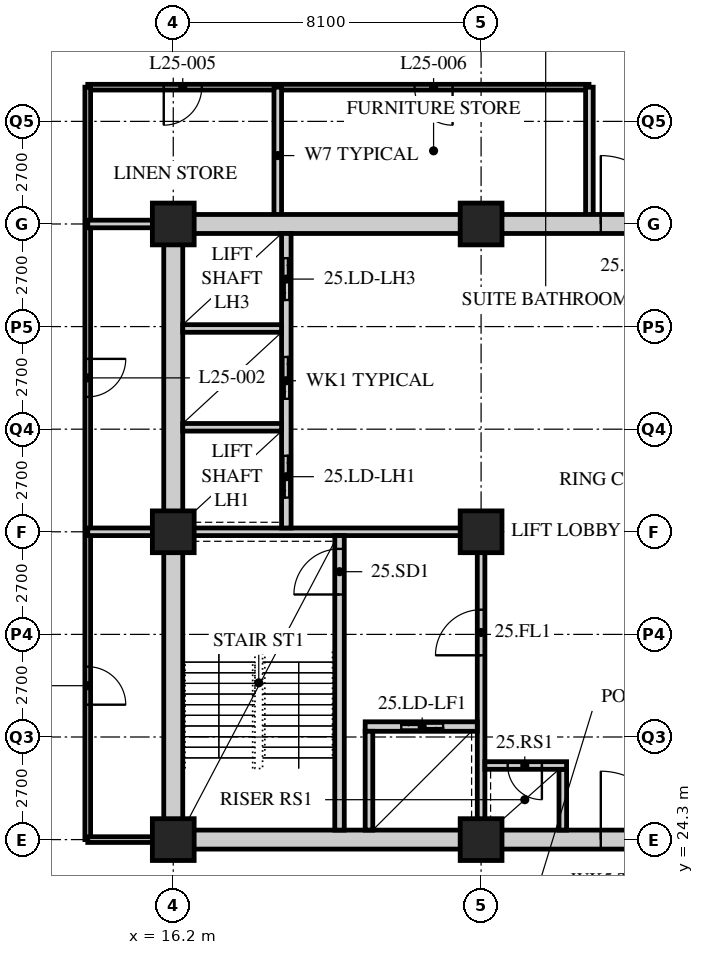
"""IFC4 building model, lengths in metres.
Left out: names, types, materials, properties, quantities, classifications, styles, units other than length and angle.
Written with IfcOpenShell. Run it as: python <this file> out.ifc"""

import sys

from ifc_helpers import new_model, si_unit, direction, frame, frame_2d, origin, origin_2d, place, context, subcontext, project, spatial, rectangle, hollow_rectangle, extrude, element, fill, save


model = new_model("IFC4")
c1 = context("Model", 3, precision=1e-05, world=origin(), true_north=direction((0.0, 1.0)))
c2 = subcontext(c1, "Body", "Model", "MODEL_VIEW")
j1 = project(units=[si_unit("LENGTHUNIT", "METRE"), si_unit("PLANEANGLEUNIT", "RADIAN")], contexts=[c1])
p1 = place(None, origin())
s1 = spatial("IfcSite", under=j1, at=p1, CompositionType="ELEMENT")
p2 = place(p1, origin())
s2 = spatial("IfcBuilding", under=s1, at=p2, CompositionType="ELEMENT")
p3 = place(p2, frame((0.0, 0.0, 103.4)))
s3 = spatial("IfcBuildingStorey", under=s2, at=p3, CompositionType="ELEMENT", Elevation=103.4)
for number, where, z_axis, x_axis in (
    (1, (16.2, 24.3, 0.0), (0.0, 0.0, 1.0), (1.0, 0.0, 0.0)),
    (2, (16.2, 32.4, 0.0), (0.0, 0.0, 1.0), (1.0, 0.0, 0.0)),
    (3, (16.2, 40.5, 0.0), (0.0, 0.0, 1.0), (1.0, 0.0, 0.0)),
    (4, (24.3, 24.3, 0.0), (0.0, 0.0, 1.0), (1.0, 0.0, 0.0)),
    (5, (24.3, 32.4, 0.0), (0.0, 0.0, 1.0), (1.0, 0.0, 0.0)),
    (6, (24.3, 40.5, 0.0), (0.0, 0.0, 1.0), (1.0, 0.0, 0.0)),
):
    element("IfcColumn", number, at=place(p3, frame(where, z_axis=z_axis, x_axis=x_axis)), inside=s3, PredefinedType="COLUMN", context=c2, shape_type="SweptSolid", body=[
        extrude(hollow_rectangle(XDim=1.1, YDim=1.1, WallThickness=0.1, at=origin_2d()), origin(), (0.0, 0.0, 1.0), 3.4),
    ])
p4 = place(p3, frame((27.14, 44.1, 0.0), z_axis=(0.0, 0.0, 1.0), x_axis=(-1.0, 0.0, 0.0)))
e7 = element("IfcWall", 7, at=p4, inside=s3, PredefinedType="PARTITIONING", context=c2, shape_type="SweptSolid", body=[
    extrude(rectangle(XDim=13.19, YDim=0.15, at=frame_2d((6.595, 0.0))), origin(), (0.0, 0.0, 1.0), 3.19),
])
p5 = place(p4, frame((10.19, 0.0, 0.0)))
e8 = element("IfcOpeningElement", 8, at=p5, cuts=e7, PredefinedType="OPENING", context=c2, shape_type="SweptSolid", body=[
    extrude(rectangle(XDim=1.0, YDim=2.1, at=frame_2d((0.5, 1.05))), frame((0.0, 0.085, 0.0), z_axis=(0.0, -1.0, 0.0), x_axis=(1.0, 0.0, 0.0)), (0.0, 0.0, 1.0), 0.17),
])
p6 = place(p4, frame((3.59, 0.0, 0.0)))
e9 = element("IfcOpeningElement", 9, at=p6, cuts=e7, PredefinedType="OPENING", context=c2, shape_type="SweptSolid", body=[
    extrude(rectangle(XDim=1.0, YDim=2.1, at=frame_2d((0.5, 1.05))), frame((0.0, 0.085, 0.0), z_axis=(0.0, -1.0, 0.0), x_axis=(1.0, 0.0, 0.0)), (0.0, 0.0, 1.0), 0.17),
])
p7 = place(p3, frame((13.95, 44.1, 0.0), z_axis=(0.0, 0.0, 1.0), x_axis=(0.0, -1.0, 0.0)))
e10 = element("IfcWall", 10, at=p7, inside=s3, PredefinedType="PARTITIONING", context=c2, shape_type="SweptSolid", body=[
    extrude(rectangle(XDim=19.8, YDim=0.15, at=frame_2d((9.9, 0.0))), origin(), (0.0, 0.0, 1.0), 3.19),
])
p8 = place(p7, frame((15.25, 0.0, 0.0)))
e11 = element("IfcOpeningElement", 11, at=p8, cuts=e10, PredefinedType="OPENING", context=c2, shape_type="SweptSolid", body=[
    extrude(rectangle(XDim=1.0, YDim=2.1, at=frame_2d((0.5, 1.05))), frame((0.0, 0.085, 0.0), z_axis=(0.0, -1.0, 0.0), x_axis=(1.0, 0.0, 0.0)), (0.0, 0.0, 1.0), 0.17),
])
p9 = place(p7, frame((7.15, 0.0, 0.0)))
e12 = element("IfcOpeningElement", 12, at=p9, cuts=e10, PredefinedType="OPENING", context=c2, shape_type="SweptSolid", body=[
    extrude(rectangle(XDim=1.0, YDim=2.1, at=frame_2d((0.5, 1.05))), frame((0.0, 0.085, 0.0), z_axis=(0.0, -1.0, 0.0), x_axis=(1.0, 0.0, 0.0)), (0.0, 0.0, 1.0), 0.17),
])
p10 = place(p3, frame((13.95, 24.3, 0.0), z_axis=(0.0, 0.0, 1.0), x_axis=(1.0, 0.0, 0.0)))
e13 = element("IfcWall", 13, at=p10, inside=s3, PredefinedType="PARTITIONING", context=c2, shape_type="SweptSolid", body=[
    extrude(rectangle(XDim=2.05, YDim=0.15, at=frame_2d((1.025, 0.0))), origin(), (0.0, 0.0, 1.0), 3.19),
])
p11 = place(p3, frame((13.95, 32.4, 0.0), z_axis=(0.0, 0.0, 1.0), x_axis=(1.0, 0.0, 0.0)))
e14 = element("IfcWall", 14, at=p11, inside=s3, PredefinedType="SOLIDWALL", context=c2, shape_type="SweptSolid", body=[
    extrude(rectangle(XDim=2.25, YDim=0.2, at=frame_2d((1.125, 0.0))), origin(), (0.0, 0.0, 1.0), 3.19),
])
for number, where, z_axis, x_axis in (
    (15, (18.95, 44.1, 0.0), (0.0, 0.0, 1.0), (0.0, -1.0, 0.0)),
    (16, (27.15, 40.5, 0.0), (0.0, 0.0, 1.0), (0.0, 1.0, 0.0)),
):
    element("IfcWall", number, at=place(p3, frame(where, z_axis=z_axis, x_axis=x_axis)), inside=s3, PredefinedType="SOLIDWALL", context=c2, shape_type="SweptSolid", body=[
        extrude(rectangle(XDim=3.6, YDim=0.2, at=frame_2d((1.8, 0.0))), origin(), (0.0, 0.0, 1.0), 3.19),
    ])
p12 = place(p3, frame((13.95, 40.5, 0.0), z_axis=(0.0, 0.0, 1.0), x_axis=(1.0, 0.0, 0.0)))
e17 = element("IfcWall", 17, at=p12, inside=s3, PredefinedType="SOLIDWALL", context=c2, shape_type="SweptSolid", body=[
    extrude(rectangle(XDim=2.25, YDim=0.2, at=frame_2d((1.125, 0.0))), origin(), (0.0, 0.0, 1.0), 3.19),
])
p13 = place(p3, frame((15.95, 24.3, 0.0), z_axis=(0.0, 0.0, 1.0), x_axis=(1.0, 0.0, 0.0)))
e18 = element("IfcWall", 18, at=p13, inside=s3, PredefinedType="SOLIDWALL", context=c2, shape_type="SweptSolid", body=[
    extrude(rectangle(XDim=24.8, YDim=0.5, at=frame_2d((12.4, 0.0))), origin(), (0.0, 0.0, 1.0), 2.54),
])
p14 = place(p13, frame((11.5, 0.0, 0.0)))
e19 = element("IfcOpeningElement", 19, at=p14, cuts=e18, PredefinedType="OPENING", context=c2, shape_type="SweptSolid", body=[
    extrude(rectangle(XDim=1.8, YDim=2.4, at=frame_2d((0.9, 1.2))), frame((0.0, 0.26, 0.0), z_axis=(0.0, -1.0, 0.0), x_axis=(1.0, 0.0, 0.0)), (0.0, 0.0, 1.0), 0.52),
])
p15 = place(p3, frame((15.95, 40.5, 0.0), z_axis=(0.0, 0.0, 1.0), x_axis=(1.0, 0.0, 0.0)))
e20 = element("IfcWall", 20, at=p15, inside=s3, PredefinedType="SOLIDWALL", context=c2, shape_type="SweptSolid", body=[
    extrude(rectangle(XDim=24.8, YDim=0.5, at=frame_2d((12.4, 0.0))), origin(), (0.0, 0.0, 1.0), 2.54),
])
p16 = place(p15, frame((11.5, 0.0, 0.0)))
e21 = element("IfcOpeningElement", 21, at=p16, cuts=e20, PredefinedType="OPENING", context=c2, shape_type="SweptSolid", body=[
    extrude(rectangle(XDim=1.8, YDim=2.4, at=frame_2d((0.9, 1.2))), frame((0.0, 0.26, 0.0), z_axis=(0.0, -1.0, 0.0), x_axis=(1.0, 0.0, 0.0)), (0.0, 0.0, 1.0), 0.52),
])
p17 = place(p3, frame((16.2, 24.55, 0.0), z_axis=(0.0, 0.0, 1.0), x_axis=(0.0, 1.0, 0.0)))
e22 = element("IfcWall", 22, at=p17, inside=s3, PredefinedType="SOLIDWALL", context=c2, shape_type="SweptSolid", body=[
    extrude(rectangle(XDim=15.7, YDim=0.5, at=frame_2d((7.85, 0.0))), origin(), (0.0, 0.0, 1.0), 2.578),
])
p18 = place(p3, frame((16.45, 32.4, 0.0), z_axis=(0.0, 0.0, 1.0), x_axis=(1.0, 0.0, 0.0)))
e23 = element("IfcWall", 23, at=p18, inside=s3, PredefinedType="SOLIDWALL", context=c2, shape_type="SweptSolid", body=[
    extrude(rectangle(XDim=7.95, YDim=0.2, at=frame_2d((3.975, 0.0))), origin(), (0.0, 0.0, 1.0), 2.578),
])
p19 = place(p3, frame((24.3, 24.55, 0.0), z_axis=(0.0, 0.0, 1.0), x_axis=(0.0, 1.0, 0.0)))
e24 = element("IfcWall", 24, at=p19, inside=s3, PredefinedType="SOLIDWALL", context=c2, shape_type="SweptSolid", body=[
    extrude(rectangle(XDim=7.75, YDim=0.2, at=frame_2d((3.875, 0.0))), origin(), (0.0, 0.0, 1.0), 2.578),
])
p20 = place(p19, frame((4.6, 0.0, 0.0)))
e25 = element("IfcOpeningElement", 25, at=p20, cuts=e24, PredefinedType="OPENING", context=c2, shape_type="SweptSolid", body=[
    extrude(rectangle(XDim=1.2, YDim=2.1, at=frame_2d((0.6, 1.05))), frame((0.0, 0.11, 0.0), z_axis=(0.0, -1.0, 0.0), x_axis=(1.0, 0.0, 0.0)), (0.0, 0.0, 1.0), 0.22),
])
p21 = place(p3, frame((20.575, 24.55, 0.0), z_axis=(0.0, 0.0, 1.0), x_axis=(0.0, 1.0, 0.0)))
e26 = element("IfcWall", 26, at=p21, inside=s3, PredefinedType="SOLIDWALL", context=c2, shape_type="SweptSolid", body=[
    extrude(rectangle(XDim=7.75, YDim=0.25, at=frame_2d((3.875, 0.0))), origin(), (0.0, 0.0, 1.0), 3.19),
])
p22 = place(p21, frame((6.2, 0.0, 0.0)))
e27 = element("IfcOpeningElement", 27, at=p22, cuts=e26, PredefinedType="OPENING", context=c2, shape_type="SweptSolid", body=[
    extrude(rectangle(XDim=1.2, YDim=2.1, at=frame_2d((0.6, 1.05))), frame((0.0, 0.135, 0.0), z_axis=(0.0, -1.0, 0.0), x_axis=(1.0, 0.0, 0.0)), (0.0, 0.0, 1.0), 0.27),
])
p23 = place(p3, frame((21.25, 27.275, 0.0), z_axis=(0.0, 0.0, 1.0), x_axis=(1.0, 0.0, 0.0)))
e28 = element("IfcWall", 28, at=p23, inside=s3, PredefinedType="SOLIDWALL", context=c2, shape_type="SweptSolid", body=[
    extrude(rectangle(XDim=2.95, YDim=0.25, at=frame_2d((1.475, 0.0))), origin(), (0.0, 0.0, 1.0), 3.19),
])
p24 = place(p23, frame((0.95, 0.0, 0.0)))
e29 = element("IfcOpeningElement", 29, at=p24, cuts=e28, PredefinedType="OPENING", context=c2, shape_type="SweptSolid", body=[
    extrude(rectangle(XDim=1.1, YDim=2.4, at=frame_2d((0.55, 1.2))), frame((0.0, 0.135, 0.0), z_axis=(0.0, -1.0, 0.0), x_axis=(1.0, 0.0, 0.0)), (0.0, 0.0, 1.0), 0.27),
])
p25 = place(p3, frame((21.35, 24.55, 0.0), z_axis=(0.0, 0.0, 1.0), x_axis=(0.0, 1.0, 0.0)))
e30 = element("IfcWall", 30, at=p25, inside=s3, PredefinedType="SOLIDWALL", context=c2, shape_type="SweptSolid", body=[
    extrude(rectangle(XDim=2.6, YDim=0.2, at=frame_2d((1.3, 0.0))), origin(), (0.0, 0.0, 1.0), 3.19),
])
p26 = place(p3, frame((19.175, 32.5, 0.0), z_axis=(0.0, 0.0, 1.0), x_axis=(0.0, 1.0, 0.0)))
e31 = element("IfcWall", 31, at=p26, inside=s3, PredefinedType="SOLIDWALL", context=c2, shape_type="SweptSolid", body=[
    extrude(rectangle(XDim=7.75, YDim=0.25, at=frame_2d((3.875, 0.0))), origin(), (0.0, 0.0, 1.0), 3.19),
])
p27 = place(p26, frame((0.8, 0.0, 0.0)))
e32 = element("IfcOpeningElement", 32, at=p27, cuts=e31, PredefinedType="OPENING", context=c2, shape_type="SweptSolid", body=[
    extrude(rectangle(XDim=1.1, YDim=2.4, at=frame_2d((0.55, 1.2))), frame((0.0, 0.135, 0.0), z_axis=(0.0, -1.0, 0.0), x_axis=(1.0, 0.0, 0.0)), (0.0, 0.0, 1.0), 0.27),
])
p28 = place(p26, frame((3.4, 0.0, 0.0)))
e33 = element("IfcOpeningElement", 33, at=p28, cuts=e31, PredefinedType="OPENING", context=c2, shape_type="SweptSolid", body=[
    extrude(rectangle(XDim=1.1, YDim=2.4, at=frame_2d((0.55, 1.2))), frame((0.0, 0.135, 0.0), z_axis=(0.0, -1.0, 0.0), x_axis=(1.0, 0.0, 0.0)), (0.0, 0.0, 1.0), 0.27),
])
p29 = place(p26, frame((6.0, 0.0, 0.0)))
e34 = element("IfcOpeningElement", 34, at=p29, cuts=e31, PredefinedType="OPENING", context=c2, shape_type="SweptSolid", body=[
    extrude(rectangle(XDim=1.1, YDim=2.4, at=frame_2d((0.55, 1.2))), frame((0.0, 0.135, 0.0), z_axis=(0.0, -1.0, 0.0), x_axis=(1.0, 0.0, 0.0)), (0.0, 0.0, 1.0), 0.27),
])
for number, where, z_axis, x_axis in (
    (35, (16.45, 35.15, 0.0), (0.0, 0.0, 1.0), (1.0, 0.0, 0.0)),
    (36, (16.45, 37.75, 0.0), (0.0, 0.0, 1.0), (1.0, 0.0, 0.0)),
):
    element("IfcWall", number, at=place(p3, frame(where, z_axis=z_axis, x_axis=x_axis)), inside=s3, PredefinedType="SOLIDWALL", context=c2, shape_type="SweptSolid", body=[
        extrude(rectangle(XDim=2.6, YDim=0.2, at=frame_2d((1.3, 0.0))), origin(), (0.0, 0.0, 1.0), 3.19),
    ])
p30 = place(p3, frame((26.45, 24.55, 0.0), z_axis=(0.0, 0.0, 1.0), x_axis=(0.0, 1.0, 0.0)))
e37 = element("IfcWall", 37, at=p30, inside=s3, PredefinedType="SOLIDWALL", context=c2, shape_type="SweptSolid", body=[
    extrude(rectangle(XDim=1.6, YDim=0.2, at=frame_2d((0.8, 0.0))), origin(), (0.0, 0.0, 1.0), 3.19),
])
p31 = place(p3, frame((24.4, 26.25, 0.0), z_axis=(0.0, 0.0, 1.0), x_axis=(1.0, 0.0, 0.0)))
e38 = element("IfcWall", 38, at=p31, inside=s3, PredefinedType="SOLIDWALL", context=c2, shape_type="SweptSolid", body=[
    extrude(rectangle(XDim=2.15, YDim=0.2, at=frame_2d((1.075, 0.0))), origin(), (0.0, 0.0, 1.0), 3.19),
])
p32 = place(p31, frame((0.6, 0.0, 0.0)))
e39 = element("IfcOpeningElement", 39, at=p32, cuts=e38, PredefinedType="OPENING", context=c2, shape_type="SweptSolid", body=[
    extrude(rectangle(XDim=0.9, YDim=2.1, at=frame_2d((0.45, 1.05))), frame((0.0, 0.11, 0.0), z_axis=(0.0, -1.0, 0.0), x_axis=(1.0, 0.0, 0.0)), (0.0, 0.0, 1.0), 0.22),
])
p33 = place(p8, origin())
e40 = element("IfcDoor", 40, at=p33, inside=s3, OperationType="SINGLE_SWING_RIGHT", PredefinedType="DOOR", context=c2, shape_type="SweptSolid", body=[
    extrude(rectangle(XDim=1.0, YDim=2.1, at=frame_2d((0.5, 1.05))), frame((0.0, 0.025, 0.0), z_axis=(0.0, -1.0, 0.0), x_axis=(1.0, 0.0, 0.0)), (0.0, 0.0, 1.0), 0.05),
])
fill(e11, e40)
p34 = place(p9, origin())
e41 = element("IfcDoor", 41, at=p34, inside=s3, OperationType="SINGLE_SWING_LEFT", PredefinedType="DOOR", context=c2, shape_type="SweptSolid", body=[
    extrude(rectangle(XDim=1.0, YDim=2.1, at=frame_2d((0.5, 1.05))), frame((0.0, 0.025, 0.0), z_axis=(0.0, -1.0, 0.0), x_axis=(1.0, 0.0, 0.0)), (0.0, 0.0, 1.0), 0.05),
])
fill(e12, e41)
p35 = place(p5, origin())
e42 = element("IfcDoor", 42, at=p35, inside=s3, OperationType="SINGLE_SWING_RIGHT", PredefinedType="DOOR", context=c2, shape_type="SweptSolid", body=[
    extrude(rectangle(XDim=1.0, YDim=2.1, at=frame_2d((0.5, 1.05))), frame((0.0, 0.025, 0.0), z_axis=(0.0, -1.0, 0.0), x_axis=(1.0, 0.0, 0.0)), (0.0, 0.0, 1.0), 0.05),
])
fill(e8, e42)
p36 = place(p6, origin())
e43 = element("IfcDoor", 43, at=p36, inside=s3, OperationType="SINGLE_SWING_LEFT", PredefinedType="DOOR", context=c2, shape_type="SweptSolid", body=[
    extrude(rectangle(XDim=1.0, YDim=2.1, at=frame_2d((0.5, 1.05))), frame((0.0, 0.025, 0.0), z_axis=(0.0, -1.0, 0.0), x_axis=(1.0, 0.0, 0.0)), (0.0, 0.0, 1.0), 0.05),
])
fill(e9, e43)
p37 = place(p22, origin())
e44 = element("IfcDoor", 44, at=p37, inside=s3, OperationType="SINGLE_SWING_LEFT", PredefinedType="DOOR", context=c2, shape_type="SweptSolid", body=[
    extrude(rectangle(XDim=1.2, YDim=2.1, at=frame_2d((0.6, 1.05))), frame((0.0, 0.025, 0.0), z_axis=(0.0, -1.0, 0.0), x_axis=(1.0, 0.0, 0.0)), (0.0, 0.0, 1.0), 0.05),
])
fill(e27, e44)
p38 = place(p20, origin())
e45 = element("IfcDoor", 45, at=p38, inside=s3, OperationType="SINGLE_SWING_LEFT", PredefinedType="DOOR", context=c2, shape_type="SweptSolid", body=[
    extrude(rectangle(XDim=1.2, YDim=2.1, at=frame_2d((0.6, 1.05))), frame((0.0, 0.025, 0.0), z_axis=(0.0, -1.0, 0.0), x_axis=(1.0, 0.0, 0.0)), (0.0, 0.0, 1.0), 0.05),
])
fill(e25, e45)
p39 = place(p32, origin())
e46 = element("IfcDoor", 46, at=p39, inside=s3, OperationType="SINGLE_SWING_LEFT", PredefinedType="DOOR", context=c2, shape_type="SweptSolid", body=[
    extrude(rectangle(XDim=0.9, YDim=2.1, at=frame_2d((0.45, 1.05))), frame((0.0, 0.025, 0.0), z_axis=(0.0, -1.0, 0.0), x_axis=(1.0, 0.0, 0.0)), (0.0, 0.0, 1.0), 0.05),
])
fill(e39, e46)
p40 = place(p27, origin())
e47 = element("IfcDoor", 47, at=p40, inside=s3, OperationType="DOUBLE_DOOR_SLIDING", PredefinedType="DOOR", context=c2, shape_type="SweptSolid", body=[
    extrude(rectangle(XDim=1.1, YDim=2.4, at=frame_2d((0.55, 1.2))), frame((0.0, 0.025, 0.0), z_axis=(0.0, -1.0, 0.0), x_axis=(1.0, 0.0, 0.0)), (0.0, 0.0, 1.0), 0.05),
])
fill(e32, e47)
p41 = place(p28, origin())
e48 = element("IfcDoor", 48, at=p41, inside=s3, OperationType="DOUBLE_DOOR_SLIDING", PredefinedType="DOOR", context=c2, shape_type="SweptSolid", body=[
    extrude(rectangle(XDim=1.1, YDim=2.4, at=frame_2d((0.55, 1.2))), frame((0.0, 0.025, 0.0), z_axis=(0.0, -1.0, 0.0), x_axis=(1.0, 0.0, 0.0)), (0.0, 0.0, 1.0), 0.05),
])
fill(e33, e48)
p42 = place(p29, origin())
e49 = element("IfcDoor", 49, at=p42, inside=s3, OperationType="DOUBLE_DOOR_SLIDING", PredefinedType="DOOR", context=c2, shape_type="SweptSolid", body=[
    extrude(rectangle(XDim=1.1, YDim=2.4, at=frame_2d((0.55, 1.2))), frame((0.0, 0.025, 0.0), z_axis=(0.0, -1.0, 0.0), x_axis=(1.0, 0.0, 0.0)), (0.0, 0.0, 1.0), 0.05),
])
fill(e34, e49)
p43 = place(p24, origin())
e50 = element("IfcDoor", 50, at=p43, inside=s3, OperationType="DOUBLE_DOOR_SLIDING", PredefinedType="DOOR", context=c2, shape_type="SweptSolid", body=[
    extrude(rectangle(XDim=1.1, YDim=2.4, at=frame_2d((0.55, 1.2))), frame((0.0, 0.025, 0.0), z_axis=(0.0, -1.0, 0.0), x_axis=(1.0, 0.0, 0.0)), (0.0, 0.0, 1.0), 0.05),
])
fill(e29, e50)
p44 = place(p14, origin())
e51 = element("IfcDoor", 51, at=p44, inside=s3, OperationType="DOUBLE_DOOR_SINGLE_SWING", PredefinedType="DOOR", context=c2, shape_type="SweptSolid", body=[
    extrude(rectangle(XDim=1.8, YDim=2.4, at=frame_2d((0.9, 1.2))), frame((0.0, 0.025, 0.0), z_axis=(0.0, -1.0, 0.0), x_axis=(1.0, 0.0, 0.0)), (0.0, 0.0, 1.0), 0.05),
])
fill(e19, e51)
p45 = place(p16, origin())
e52 = element("IfcDoor", 52, at=p45, inside=s3, OperationType="DOUBLE_DOOR_SINGLE_SWING", PredefinedType="DOOR", context=c2, shape_type="SweptSolid", body=[
    extrude(rectangle(XDim=1.8, YDim=2.4, at=frame_2d((0.9, 1.2))), frame((0.0, 0.025, 0.0), z_axis=(0.0, -1.0, 0.0), x_axis=(1.0, 0.0, 0.0)), (0.0, 0.0, 1.0), 0.05),
])
fill(e21, e52)
save(model, sys.argv[1])
